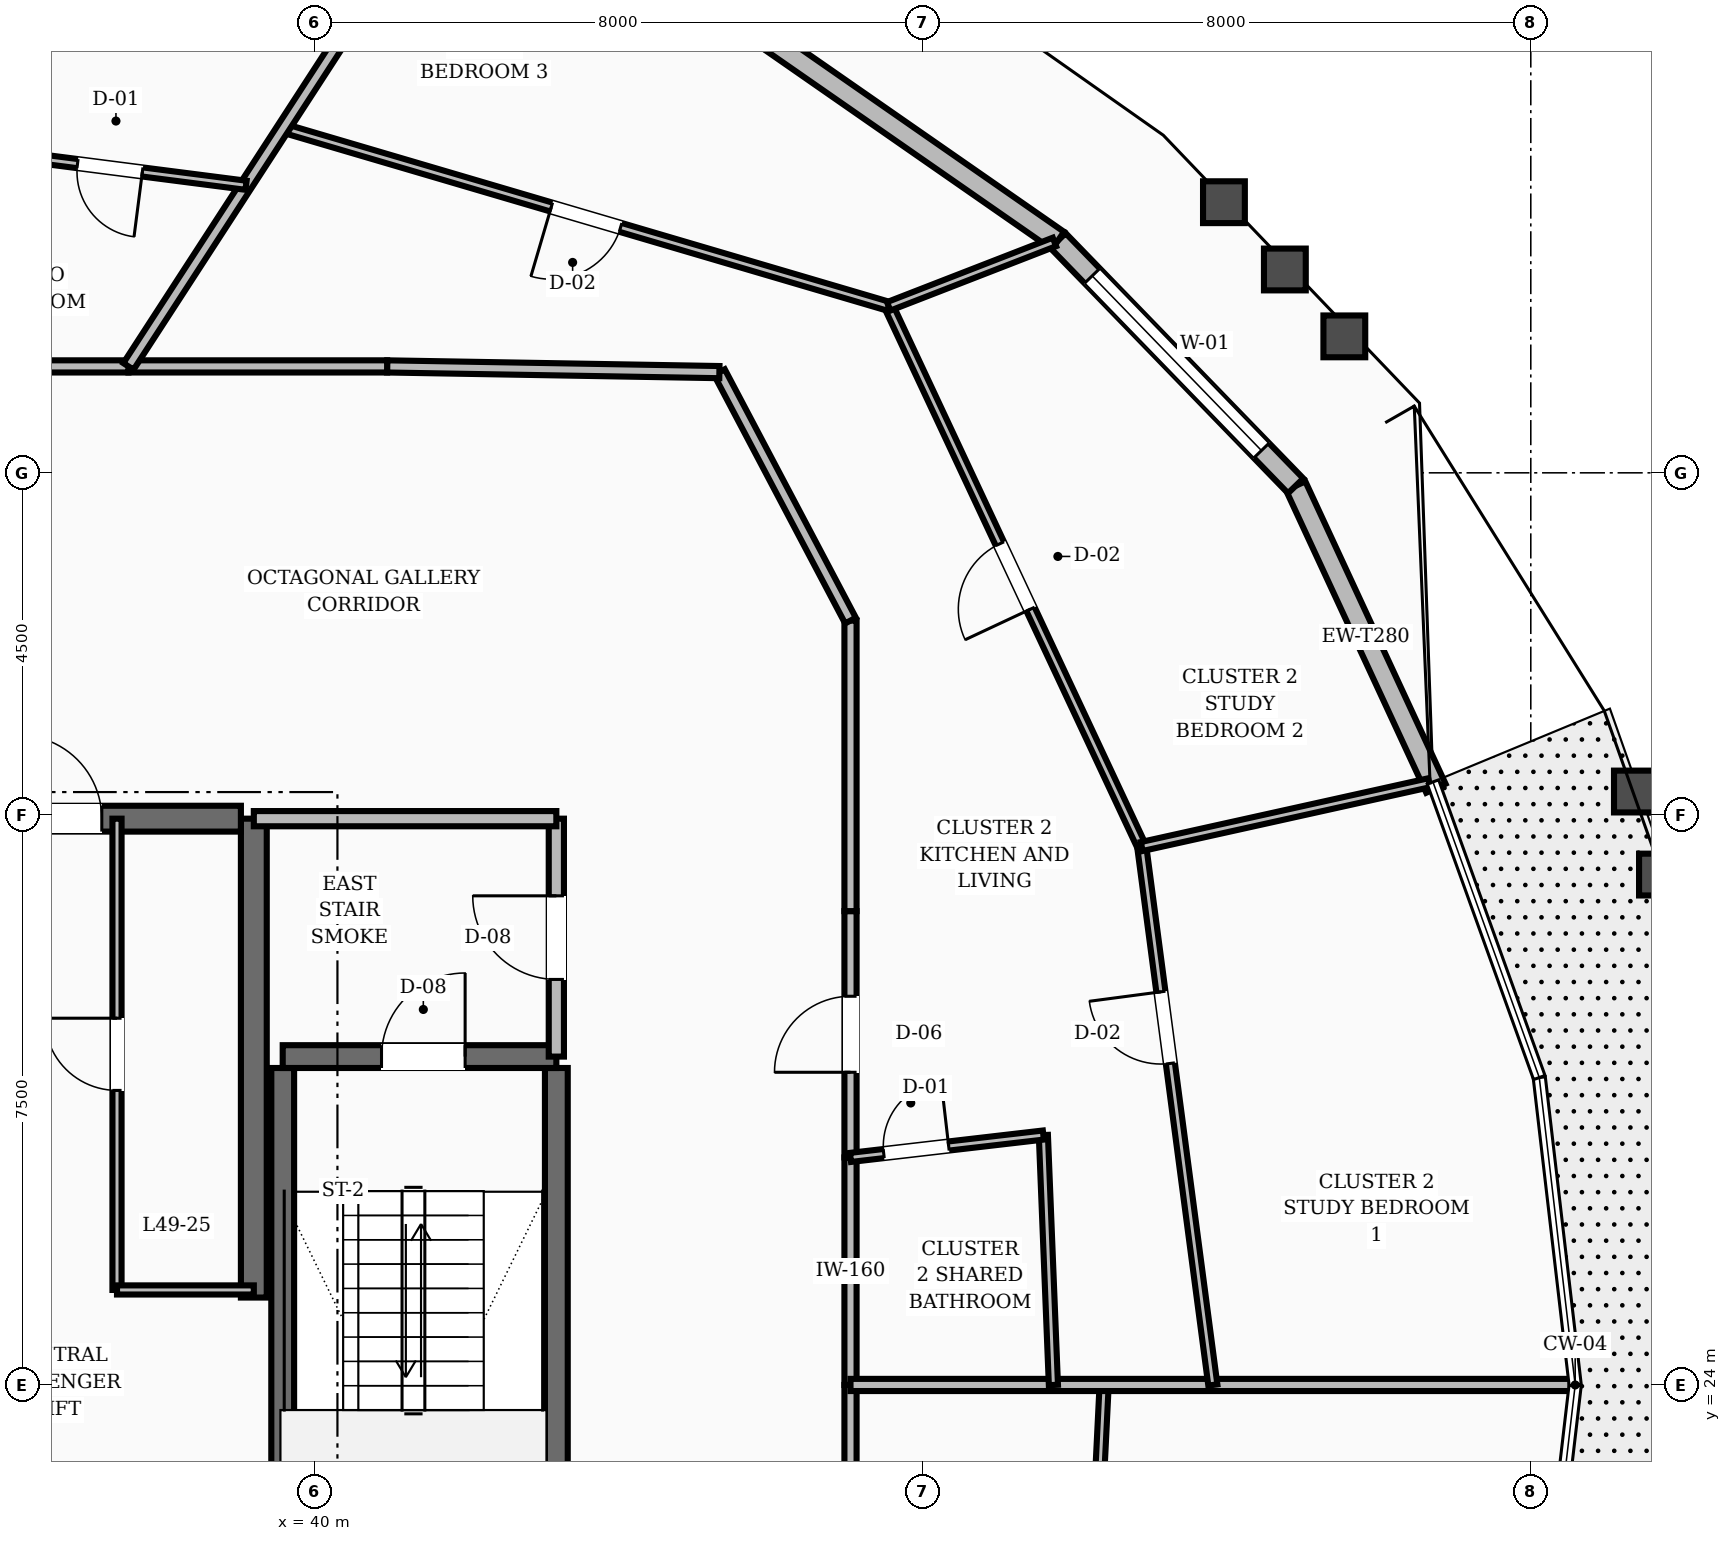
"""IFC4 building model, lengths in metres.
Left out: names, types, materials, properties, quantities, classifications, styles, units other than length and angle.
Written with IfcOpenShell. Run it as: python <this file> out.ifc"""

import sys

from ifc_helpers import new_model, si_unit, direction, frame, frame_2d, origin, place, context, subcontext, project, spatial, rectangle, extrude, element, fill, save


model = new_model("IFC4")
c1 = context("Model", 3, precision=1e-05, world=origin(), true_north=direction((0.0, 1.0)))
c2 = subcontext(c1, "Body", "Model", "MODEL_VIEW")
j1 = project(units=[si_unit("LENGTHUNIT", "METRE"), si_unit("PLANEANGLEUNIT", "RADIAN")], contexts=[c1])
p1 = place(None, origin())
s1 = spatial("IfcSite", under=j1, at=p1, CompositionType="ELEMENT")
p2 = place(p1, origin())
s2 = spatial("IfcBuilding", under=s1, at=p2, CompositionType="ELEMENT")
p3 = place(p2, frame((0.0, 0.0, 189.2)))
s3 = spatial("IfcBuildingStorey", under=s2, at=p3, CompositionType="ELEMENT", Elevation=189.2)
p4 = place(p3, frame((39.2, 25.15, 0.0), z_axis=(0.0, 0.0, 1.0), x_axis=(0.0, 1.0, 0.0)))
e1 = element("IfcWall", 1, at=p4, inside=s3, PredefinedType="SHEAR", context=c2, shape_type="SweptSolid", body=[
    extrude(rectangle(XDim=6.3, YDim=0.34, at=frame_2d((3.15, 0.0))), origin(), (0.0, 0.0, 1.0), 3.6),
])
p5 = place(p3, frame((35.8, 31.45, 0.0), z_axis=(0.0, 0.0, 1.0), x_axis=(1.0, 0.0, 0.0)))
e2 = element("IfcWall", 2, at=p5, inside=s3, PredefinedType="SHEAR", context=c2, shape_type="SweptSolid", body=[
    extrude(rectangle(XDim=3.23, YDim=0.34, at=frame_2d((1.615, 0.0))), origin(), (0.0, 0.0, 1.0), 3.6),
])
p6 = place(p5, frame((0.3, 0.0, 0.0)))
e3 = element("IfcOpeningElement", 3, at=p6, cuts=e2, PredefinedType="OPENING", context=c2, shape_type="SweptSolid", body=[
    extrude(rectangle(XDim=1.1, YDim=2.1, at=frame_2d((0.55, 1.05))), frame((0.0, 0.18, 0.0), z_axis=(0.0, -1.0, 0.0), x_axis=(1.0, 0.0, 0.0)), (0.0, 0.0, 1.0), 0.36),
])
for number, where, z_axis, x_axis in (
    (4, (43.18, 19.43, 0.0), (0.0, 0.0, 1.0), (0.0, 1.0, 0.0)),
    (5, (39.58, 19.43, 0.0), (0.0, 0.0, 1.0), (0.0, 1.0, 0.0)),
):
    element("IfcWall", number, at=place(p3, frame(where, z_axis=z_axis, x_axis=x_axis)), inside=s3, PredefinedType="SHEAR", context=c2, shape_type="SweptSolid", body=[
        extrude(rectangle(XDim=8.74, YDim=0.3, at=frame_2d((4.37, 0.0))), origin(), (0.0, 0.0, 1.0), 3.6),
    ])
p7 = place(p3, frame((39.58, 28.32, 0.0), z_axis=(0.0, 0.0, 1.0), x_axis=(1.0, 0.0, 0.0)))
e6 = element("IfcWall", 6, at=p7, inside=s3, PredefinedType="SHEAR", context=c2, shape_type="SweptSolid", body=[
    extrude(rectangle(XDim=3.6, YDim=0.3, at=frame_2d((1.8, 0.0))), origin(), (0.0, 0.0, 1.0), 3.6),
])
p8 = place(p7, frame((1.3, 0.0, 0.0)))
e7 = element("IfcOpeningElement", 7, at=p8, cuts=e6, PredefinedType="OPENING", context=c2, shape_type="SweptSolid", body=[
    extrude(rectangle(XDim=1.1, YDim=2.1, at=frame_2d((0.55, 1.05))), frame((0.0, 0.16, 0.0), z_axis=(0.0, -1.0, 0.0), x_axis=(1.0, 0.0, 0.0)), (0.0, 0.0, 1.0), 0.32),
])
p9 = place(p3, frame((54.751, 31.85, 0.0), z_axis=(0.0, 0.0, 1.0), x_axis=(-0.420677836113, 0.907210095955, 0.0)))
e8 = element("IfcWall", 8, at=p9, inside=s3, PredefinedType="STANDARD", context=c2, shape_type="SweptSolid", body=[
    extrude(rectangle(XDim=4.386, YDim=0.28, at=frame_2d((2.193, 0.0))), origin(), (0.0, 0.0, 1.0), 2.82),
])
p10 = place(p3, frame((52.906, 35.829, 0.0), z_axis=(0.0, 0.0, 1.0), x_axis=(-0.695935353848, 0.718104437575, 0.0)))
e9 = element("IfcWall", 9, at=p10, inside=s3, PredefinedType="STANDARD", context=c2, shape_type="SweptSolid", body=[
    extrude(rectangle(XDim=4.493, YDim=0.28, at=frame_2d((2.247, 0.0))), origin(), (0.0, 0.0, 1.0), 2.82),
])
p11 = place(p10, frame((0.646, 0.0, 0.8)))
e10 = element("IfcOpeningElement", 10, at=p11, cuts=e9, PredefinedType="OPENING", context=c2, shape_type="SweptSolid", body=[
    extrude(rectangle(XDim=3.2, YDim=1.65, at=frame_2d((1.6, 0.825))), frame((0.0, 0.15, 0.0), z_axis=(0.0, -1.0, 0.0), x_axis=(1.0, 0.0, 0.0)), (0.0, 0.0, 1.0), 0.3),
])
p12 = place(p3, frame((49.78, 39.055, 0.0), z_axis=(0.0, 0.0, 1.0), x_axis=(-0.821202162047, 0.570637370885, 0.0)))
e11 = element("IfcWall", 11, at=p12, inside=s3, PredefinedType="STANDARD", context=c2, shape_type="SweptSolid", body=[
    extrude(rectangle(XDim=4.64, YDim=0.28, at=frame_2d((2.32, 0.0))), origin(), (0.0, 0.0, 1.0), 2.82),
])
p13 = place(p3, frame((43.18, 28.32, 0.0), z_axis=(0.0, 0.0, 1.0), x_axis=(0.0, 1.0, 0.0)))
e12 = element("IfcWall", 12, at=p13, inside=s3, PredefinedType="SOLIDWALL", context=c2, shape_type="SweptSolid", body=[
    extrude(rectangle(XDim=3.13, YDim=0.2, at=frame_2d((1.565, 0.0))), origin(), (0.0, 0.0, 1.0), 2.8),
])
p14 = place(p13, frame((1.015, 0.0, 0.0)))
e13 = element("IfcOpeningElement", 13, at=p14, cuts=e12, PredefinedType="OPENING", context=c2, shape_type="SweptSolid", body=[
    extrude(rectangle(XDim=1.1, YDim=2.1, at=frame_2d((0.55, 1.05))), frame((0.0, 0.11, 0.0), z_axis=(0.0, -1.0, 0.0), x_axis=(1.0, 0.0, 0.0)), (0.0, 0.0, 1.0), 0.22),
])
p15 = place(p3, frame((39.2, 31.45, 0.0), z_axis=(0.0, 0.0, 1.0), x_axis=(1.0, 0.0, 0.0)))
e14 = element("IfcWall", 14, at=p15, inside=s3, PredefinedType="SOLIDWALL", context=c2, shape_type="SweptSolid", body=[
    extrude(rectangle(XDim=3.98, YDim=0.2, at=frame_2d((1.99, 0.0))), origin(), (0.0, 0.0, 1.0), 2.8),
])
p16 = place(p3, frame((37.4, 25.25, 0.0), z_axis=(0.0, 0.0, 1.0), x_axis=(0.0, 1.0, 0.0)))
e15 = element("IfcWall", 15, at=p16, inside=s3, PredefinedType="PARTITIONING", context=c2, shape_type="SweptSolid", body=[
    extrude(rectangle(XDim=6.2, YDim=0.12, at=frame_2d((3.1, 0.0))), origin(), (0.0, 0.0, 1.0), 2.8),
])
p17 = place(p16, frame((2.625, 0.0, 0.0)))
e16 = element("IfcOpeningElement", 16, at=p17, cuts=e15, PredefinedType="OPENING", context=c2, shape_type="SweptSolid", body=[
    extrude(rectangle(XDim=0.95, YDim=2.1, at=frame_2d((0.475, 1.05))), frame((0.0, 0.07, 0.0), z_axis=(0.0, -1.0, 0.0), x_axis=(1.0, 0.0, 0.0)), (0.0, 0.0, 1.0), 0.14),
])
p18 = place(p3, frame((37.4, 25.25, 0.0), z_axis=(0.0, 0.0, 1.0), x_axis=(1.0, 0.0, 0.0)))
e17 = element("IfcWall", 17, at=p18, inside=s3, PredefinedType="PARTITIONING", context=c2, shape_type="SweptSolid", body=[
    extrude(rectangle(XDim=1.8, YDim=0.12, at=frame_2d((0.9, 0.0))), origin(), (0.0, 0.0, 1.0), 2.8),
])
p19 = place(p3, frame((47.05, 24.0, 0.0), z_axis=(0.0, 0.0, 1.0), x_axis=(0.0, 1.0, 0.0)))
e18 = element("IfcWall", 18, at=p19, inside=s3, PredefinedType="SOLIDWALL", context=c2, shape_type="SweptSolid", body=[
    extrude(rectangle(XDim=2.994, YDim=0.16, at=frame_2d((1.497, 0.0))), origin(), (0.0, 0.0, 1.0), 2.8),
])
p20 = place(p3, frame((47.05, 26.994, 0.0), z_axis=(0.0, 0.0, 1.0), x_axis=(0.0, 1.0, 0.0)))
e19 = element("IfcWall", 19, at=p20, inside=s3, PredefinedType="SOLIDWALL", context=c2, shape_type="SweptSolid", body=[
    extrude(rectangle(XDim=3.24, YDim=0.16, at=frame_2d((1.62, 0.0))), origin(), (0.0, 0.0, 1.0), 2.8),
])
p21 = place(p20, frame((1.12, 0.0, 0.0)))
e20 = element("IfcOpeningElement", 20, at=p21, cuts=e19, PredefinedType="OPENING", context=c2, shape_type="SweptSolid", body=[
    extrude(rectangle(XDim=1.0, YDim=2.1, at=frame_2d((0.5, 1.05))), frame((0.0, 0.09, 0.0), z_axis=(0.0, -1.0, 0.0), x_axis=(1.0, 0.0, 0.0)), (0.0, 0.0, 1.0), 0.18),
])
p22 = place(p3, frame((47.05, 30.234, 0.0), z_axis=(0.0, 0.0, 1.0), x_axis=(0.0, 1.0, 0.0)))
e21 = element("IfcWall", 21, at=p22, inside=s3, PredefinedType="SOLIDWALL", context=c2, shape_type="SweptSolid", body=[
    extrude(rectangle(XDim=3.822, YDim=0.16, at=frame_2d((1.911, 0.0))), origin(), (0.0, 0.0, 1.0), 2.8),
])
p23 = place(p3, frame((47.05, 34.056, 0.0), z_axis=(0.0, 0.0, 1.0), x_axis=(-0.466737093093, 0.884396113702, 0.0)))
e22 = element("IfcWall", 22, at=p23, inside=s3, PredefinedType="SOLIDWALL", context=c2, shape_type="SweptSolid", body=[
    extrude(rectangle(XDim=3.696, YDim=0.16, at=frame_2d((1.848, 0.0))), origin(), (0.0, 0.0, 1.0), 2.8),
])
p24 = place(p3, frame((45.325, 37.325, 0.0), z_axis=(0.0, 0.0, 1.0), x_axis=(-0.999853038912, 0.017143528788, 0.0)))
e23 = element("IfcWall", 23, at=p24, inside=s3, PredefinedType="SOLIDWALL", context=c2, shape_type="SweptSolid", body=[
    extrude(rectangle(XDim=4.372, YDim=0.16, at=frame_2d((2.186, 0.0))), origin(), (0.0, 0.0, 1.0), 2.8),
])
p25 = place(p3, frame((40.954, 37.4, 0.0), z_axis=(0.0, 0.0, 1.0), x_axis=(-1.0, 0.0, 0.0)))
e24 = element("IfcWall", 24, at=p25, inside=s3, PredefinedType="SOLIDWALL", context=c2, shape_type="SweptSolid", body=[
    extrude(rectangle(XDim=3.403, YDim=0.16, at=frame_2d((1.702, 0.0))), origin(), (0.0, 0.0, 1.0), 2.8),
])
p26 = place(p3, frame((37.551, 37.4, 0.0), z_axis=(0.0, 0.0, 1.0), x_axis=(-1.0, 0.0, 0.0)))
e25 = element("IfcWall", 25, at=p26, inside=s3, PredefinedType="SOLIDWALL", context=c2, shape_type="SweptSolid", body=[
    extrude(rectangle(XDim=2.885, YDim=0.16, at=frame_2d((1.443, 0.0))), origin(), (0.0, 0.0, 1.0), 2.8),
])
p27 = place(p3, frame((47.05, 21.006, 0.0), z_axis=(0.0, 0.0, 1.0), x_axis=(0.0, 1.0, 0.0)))
e26 = element("IfcWall", 26, at=p27, inside=s3, PredefinedType="SOLIDWALL", context=c2, shape_type="SweptSolid", body=[
    extrude(rectangle(XDim=2.994, YDim=0.16, at=frame_2d((1.497, 0.0))), origin(), (0.0, 0.0, 1.0), 2.8),
])
p28 = place(p3, frame((50.222, 20.639, 0.0), z_axis=(0.0, 0.0, 1.0), x_axis=(0.049112654501, 0.998793245456, 0.0)))
e27 = element("IfcWall", 27, at=p28, inside=s3, PredefinedType="PARTITIONING", context=c2, shape_type="SweptSolid", body=[
    extrude(rectangle(XDim=3.365, YDim=0.12, at=frame_2d((1.683, 0.0))), origin(), (0.0, 0.0, 1.0), 2.8),
])
p29 = place(p3, frame((47.05, 24.0, 0.0), z_axis=(0.0, 0.0, 1.0), x_axis=(1.0, 0.0, 0.0)))
e28 = element("IfcWall", 28, at=p29, inside=s3, PredefinedType="SOLIDWALL", context=c2, shape_type="SweptSolid", body=[
    extrude(rectangle(XDim=9.484, YDim=0.16, at=frame_2d((4.742, 0.0))), origin(), (0.0, 0.0, 1.0), 2.8),
])
p30 = place(p3, frame((49.719, 24.0, 0.0), z_axis=(0.0, 0.0, 1.0), x_axis=(-0.040139896907, 0.999194069576, 0.0)))
e29 = element("IfcWall", 29, at=p30, inside=s3, PredefinedType="PARTITIONING", context=c2, shape_type="SweptSolid", body=[
    extrude(rectangle(XDim=3.291, YDim=0.12, at=frame_2d((1.645, 0.0))), origin(), (0.0, 0.0, 1.0), 2.8),
])
p31 = place(p3, frame((47.05, 26.994, 0.0), z_axis=(0.0, 0.0, 1.0), x_axis=(0.99334557756, 0.115171886939, 0.0)))
e30 = element("IfcWall", 30, at=p31, inside=s3, PredefinedType="PARTITIONING", context=c2, shape_type="SweptSolid", body=[
    extrude(rectangle(XDim=2.554, YDim=0.12, at=frame_2d((1.277, 0.0))), origin(), (0.0, 0.0, 1.0), 2.8),
])
p32 = place(p31, frame((0.44, 0.0, 0.0)))
e31 = element("IfcOpeningElement", 31, at=p32, cuts=e30, PredefinedType="OPENING", context=c2, shape_type="SweptSolid", body=[
    extrude(rectangle(XDim=0.86, YDim=2.1, at=frame_2d((0.43, 1.05))), frame((0.0, 0.07, 0.0), z_axis=(0.0, -1.0, 0.0), x_axis=(1.0, 0.0, 0.0)), (0.0, 0.0, 1.0), 0.14),
])
p33 = place(p3, frame((51.817, 24.0, 0.0), z_axis=(0.0, 0.0, 1.0), x_axis=(-0.130932666577, 0.991391263237, 0.0)))
e32 = element("IfcWall", 32, at=p33, inside=s3, PredefinedType="PARTITIONING", context=c2, shape_type="SweptSolid", body=[
    extrude(rectangle(XDim=7.145, YDim=0.12, at=frame_2d((3.573, 0.0))), origin(), (0.0, 0.0, 1.0), 2.8),
])
p34 = place(p33, frame((4.267, 0.0, 0.0)))
e33 = element("IfcOpeningElement", 33, at=p34, cuts=e32, PredefinedType="OPENING", context=c2, shape_type="SweptSolid", body=[
    extrude(rectangle(XDim=0.95, YDim=2.1, at=frame_2d((0.475, 1.05))), frame((0.0, 0.07, 0.0), z_axis=(0.0, -1.0, 0.0), x_axis=(1.0, 0.0, 0.0)), (0.0, 0.0, 1.0), 0.14),
])
p35 = place(p3, frame((50.881, 31.084, 0.0), z_axis=(0.0, 0.0, 1.0), x_axis=(-0.424220251882, 0.905559041638, 0.0)))
e34 = element("IfcWall", 34, at=p35, inside=s3, PredefinedType="PARTITIONING", context=c2, shape_type="SweptSolid", body=[
    extrude(rectangle(XDim=7.848, YDim=0.12, at=frame_2d((3.924, 0.0))), origin(), (0.0, 0.0, 1.0), 2.8),
])
p36 = place(p35, frame((3.449, 0.0, 0.0)))
e35 = element("IfcOpeningElement", 35, at=p36, cuts=e34, PredefinedType="OPENING", context=c2, shape_type="SweptSolid", body=[
    extrude(rectangle(XDim=0.95, YDim=2.1, at=frame_2d((0.475, 1.05))), frame((0.0, 0.07, 0.0), z_axis=(0.0, -1.0, 0.0), x_axis=(1.0, 0.0, 0.0)), (0.0, 0.0, 1.0), 0.14),
])
p37 = place(p3, frame((50.881, 31.084, 0.0), z_axis=(0.0, 0.0, 1.0), x_axis=(0.97626557747, 0.216576827584, 0.0)))
e36 = element("IfcWall", 36, at=p37, inside=s3, PredefinedType="PARTITIONING", context=c2, shape_type="SweptSolid", body=[
    extrude(rectangle(XDim=3.875, YDim=0.12, at=frame_2d((1.937, 0.0))), origin(), (0.0, 0.0, 1.0), 2.8),
])
p38 = place(p3, frame((47.552, 38.19, 0.0), z_axis=(0.0, 0.0, 1.0), x_axis=(-0.959291969072, 0.282416214254, 0.0)))
e37 = element("IfcWall", 37, at=p38, inside=s3, PredefinedType="PARTITIONING", context=c2, shape_type="SweptSolid", body=[
    extrude(rectangle(XDim=8.304, YDim=0.12, at=frame_2d((4.152, 0.0))), origin(), (0.0, 0.0, 1.0), 2.8),
])
p39 = place(p38, frame((3.677, 0.0, 0.0)))
e38 = element("IfcOpeningElement", 38, at=p39, cuts=e37, PredefinedType="OPENING", context=c2, shape_type="SweptSolid", body=[
    extrude(rectangle(XDim=0.95, YDim=2.1, at=frame_2d((0.475, 1.05))), frame((0.0, 0.07, 0.0), z_axis=(0.0, -1.0, 0.0), x_axis=(1.0, 0.0, 0.0)), (0.0, 0.0, 1.0), 0.14),
])
p40 = place(p3, frame((47.552, 38.19, 0.0), z_axis=(0.0, 0.0, 1.0), x_axis=(0.932129957901, 0.362123931249, 0.0)))
e39 = element("IfcWall", 39, at=p40, inside=s3, PredefinedType="PARTITIONING", context=c2, shape_type="SweptSolid", body=[
    extrude(rectangle(XDim=2.339, YDim=0.12, at=frame_2d((1.17, 0.0))), origin(), (0.0, 0.0, 1.0), 2.8),
])
p41 = place(p3, frame((37.551, 37.4, 0.0), z_axis=(0.0, 0.0, 1.0), x_axis=(0.544570007342, 0.838715391002, 0.0)))
e40 = element("IfcWall", 40, at=p41, inside=s3, PredefinedType="SOLIDWALL", context=c2, shape_type="SweptSolid", body=[
    extrude(rectangle(XDim=7.427, YDim=0.16, at=frame_2d((3.713, 0.0))), origin(), (0.0, 0.0, 1.0), 2.8),
])
p42 = place(p3, frame((39.098, 39.783, 0.0), z_axis=(0.0, 0.0, 1.0), x_axis=(-0.991834797851, 0.127529344747, 0.0)))
e41 = element("IfcWall", 41, at=p42, inside=s3, PredefinedType="PARTITIONING", context=c2, shape_type="SweptSolid", body=[
    extrude(rectangle(XDim=3.611, YDim=0.12, at=frame_2d((1.805, 0.0))), origin(), (0.0, 0.0, 1.0), 2.8),
])
p43 = place(p42, frame((1.375, 0.0, 0.0)))
e42 = element("IfcOpeningElement", 42, at=p43, cuts=e41, PredefinedType="OPENING", context=c2, shape_type="SweptSolid", body=[
    extrude(rectangle(XDim=0.86, YDim=2.1, at=frame_2d((0.43, 1.05))), frame((0.0, 0.07, 0.0), z_axis=(0.0, -1.0, 0.0), x_axis=(1.0, 0.0, 0.0)), (0.0, 0.0, 1.0), 0.14),
])
p44 = place(p11, origin())
e43 = element("IfcWindow", 43, at=p44, inside=s3, PartitioningType="SINGLE_PANEL", PredefinedType="WINDOW", context=c2, shape_type="SweptSolid", body=[
    extrude(rectangle(XDim=3.2, YDim=1.65, at=frame_2d((1.6, 0.825))), frame((0.0, 0.03, 0.0), z_axis=(0.0, -1.0, 0.0), x_axis=(1.0, 0.0, 0.0)), (0.0, 0.0, 1.0), 0.06),
])
fill(e10, e43)
p45 = place(p8, origin())
e44 = element("IfcDoor", 44, at=p45, inside=s3, OperationType="SINGLE_SWING_RIGHT", PredefinedType="DOOR", context=c2, shape_type="SweptSolid", body=[
    extrude(rectangle(XDim=1.1, YDim=2.1, at=frame_2d((0.55, 1.05))), frame((0.0, 0.025, 0.0), z_axis=(0.0, -1.0, 0.0), x_axis=(1.0, 0.0, 0.0)), (0.0, 0.0, 1.0), 0.05),
])
fill(e7, e44)
p46 = place(p14, origin())
e45 = element("IfcDoor", 45, at=p46, inside=s3, OperationType="SINGLE_SWING_RIGHT", PredefinedType="DOOR", context=c2, shape_type="SweptSolid", body=[
    extrude(rectangle(XDim=1.1, YDim=2.1, at=frame_2d((0.55, 1.05))), frame((0.0, 0.025, 0.0), z_axis=(0.0, -1.0, 0.0), x_axis=(1.0, 0.0, 0.0)), (0.0, 0.0, 1.0), 0.05),
])
fill(e13, e45)
p47 = place(p6, origin())
e46 = element("IfcDoor", 46, at=p47, inside=s3, OperationType="SINGLE_SWING_LEFT", PredefinedType="DOOR", context=c2, shape_type="SweptSolid", body=[
    extrude(rectangle(XDim=1.1, YDim=2.1, at=frame_2d((0.55, 1.05))), frame((0.0, 0.025, 0.0), z_axis=(0.0, -1.0, 0.0), x_axis=(1.0, 0.0, 0.0)), (0.0, 0.0, 1.0), 0.05),
])
fill(e3, e46)
p48 = place(p17, origin())
e47 = element("IfcDoor", 47, at=p48, inside=s3, OperationType="SINGLE_SWING_RIGHT", PredefinedType="DOOR", context=c2, shape_type="SweptSolid", body=[
    extrude(rectangle(XDim=0.95, YDim=2.1, at=frame_2d((0.475, 1.05))), frame((0.0, 0.025, 0.0), z_axis=(0.0, -1.0, 0.0), x_axis=(1.0, 0.0, 0.0)), (0.0, 0.0, 1.0), 0.05),
])
fill(e16, e47)
p49 = place(p32, origin())
e48 = element("IfcDoor", 48, at=p49, inside=s3, OperationType="SINGLE_SWING_RIGHT", PredefinedType="DOOR", context=c2, shape_type="SweptSolid", body=[
    extrude(rectangle(XDim=0.86, YDim=2.1, at=frame_2d((0.43, 1.05))), frame((0.0, 0.025, 0.0), z_axis=(0.0, -1.0, 0.0), x_axis=(1.0, 0.0, 0.0)), (0.0, 0.0, 1.0), 0.05),
])
fill(e31, e48)
p50 = place(p21, origin())
e49 = element("IfcDoor", 49, at=p50, inside=s3, OperationType="SINGLE_SWING_LEFT", PredefinedType="DOOR", context=c2, shape_type="SweptSolid", body=[
    extrude(rectangle(XDim=1.0, YDim=2.1, at=frame_2d((0.5, 1.05))), frame((0.0, 0.025, 0.0), z_axis=(0.0, -1.0, 0.0), x_axis=(1.0, 0.0, 0.0)), (0.0, 0.0, 1.0), 0.05),
])
fill(e20, e49)
p51 = place(p34, origin())
e50 = element("IfcDoor", 50, at=p51, inside=s3, OperationType="SINGLE_SWING_RIGHT", PredefinedType="DOOR", context=c2, shape_type="SweptSolid", body=[
    extrude(rectangle(XDim=0.95, YDim=2.1, at=frame_2d((0.475, 1.05))), frame((0.0, 0.025, 0.0), z_axis=(0.0, -1.0, 0.0), x_axis=(1.0, 0.0, 0.0)), (0.0, 0.0, 1.0), 0.05),
])
fill(e33, e50)
p52 = place(p36, origin())
e51 = element("IfcDoor", 51, at=p52, inside=s3, OperationType="SINGLE_SWING_LEFT", PredefinedType="DOOR", context=c2, shape_type="SweptSolid", body=[
    extrude(rectangle(XDim=0.95, YDim=2.1, at=frame_2d((0.475, 1.05))), frame((0.0, 0.025, 0.0), z_axis=(0.0, -1.0, 0.0), x_axis=(1.0, 0.0, 0.0)), (0.0, 0.0, 1.0), 0.05),
])
fill(e35, e51)
p53 = place(p39, origin())
e52 = element("IfcDoor", 52, at=p53, inside=s3, OperationType="SINGLE_SWING_RIGHT", PredefinedType="DOOR", context=c2, shape_type="SweptSolid", body=[
    extrude(rectangle(XDim=0.95, YDim=2.1, at=frame_2d((0.475, 1.05))), frame((0.0, 0.025, 0.0), z_axis=(0.0, -1.0, 0.0), x_axis=(1.0, 0.0, 0.0)), (0.0, 0.0, 1.0), 0.05),
])
fill(e38, e52)
p54 = place(p43, origin())
e53 = element("IfcDoor", 53, at=p54, inside=s3, OperationType="SINGLE_SWING_LEFT", PredefinedType="DOOR", context=c2, shape_type="SweptSolid", body=[
    extrude(rectangle(XDim=0.86, YDim=2.1, at=frame_2d((0.43, 1.05))), frame((0.0, 0.025, 0.0), z_axis=(0.0, -1.0, 0.0), x_axis=(1.0, 0.0, 0.0)), (0.0, 0.0, 1.0), 0.05),
])
fill(e42, e53)
save(model, sys.argv[1])
